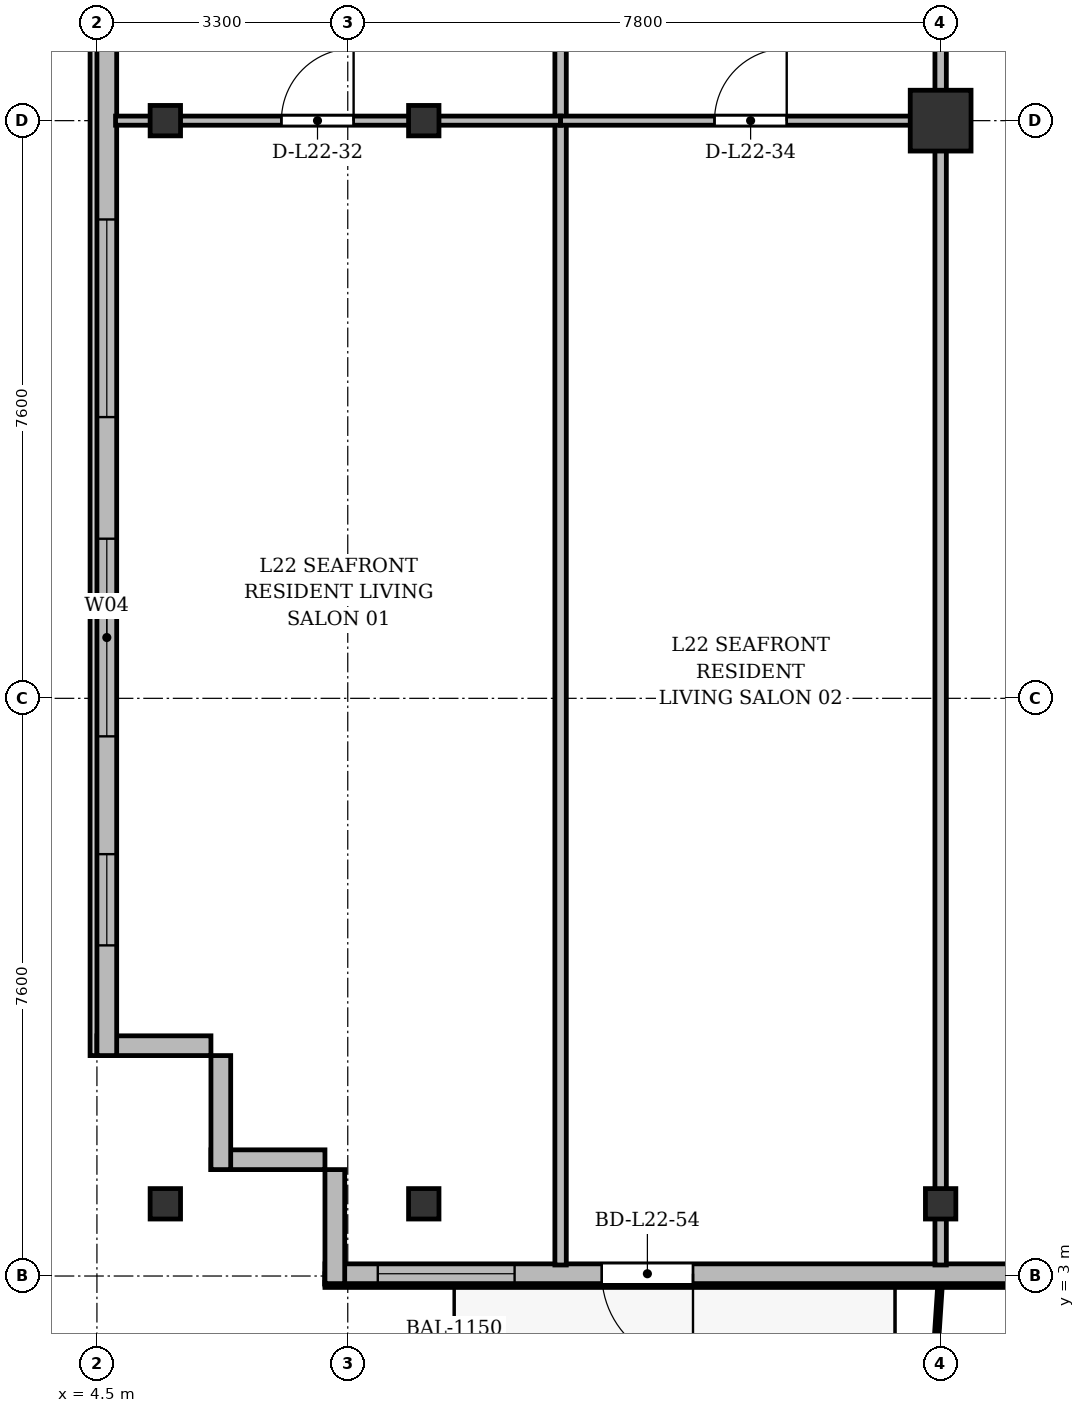
"""IFC4 building model, lengths in metres.
Left out: names, types, materials, properties, quantities, classifications, styles, units other than length and angle.
Written with IfcOpenShell. Run it as: python <this file> out.ifc"""

import sys

from ifc_helpers import new_model, si_unit, direction, frame, frame_2d, origin, origin_2d, place, context, subcontext, project, spatial, rectangle, i_section, extrude, source, transform, mapped, element, fill, save


model = new_model("IFC4")
c1 = context("Model", 3, precision=1e-05, world=origin(), true_north=direction((0.0, 1.0)))
c2 = subcontext(c1, "Body", "Model", "MODEL_VIEW")
j1 = project(units=[si_unit("LENGTHUNIT", "METRE"), si_unit("PLANEANGLEUNIT", "RADIAN")], contexts=[c1])
p1 = place(None, origin())
s1 = spatial("IfcSite", under=j1, at=p1, CompositionType="ELEMENT")
p2 = place(p1, origin())
s2 = spatial("IfcBuilding", under=s1, at=p2, CompositionType="ELEMENT")
p3 = place(p2, frame((0.0, 0.0, 88.9)))
s3 = spatial("IfcBuildingStorey", under=s2, at=p3, CompositionType="ELEMENT", Elevation=88.9)
m1 = source(origin(), c2, "Body", "SweptSolid", [
    extrude(i_section(OverallWidth=0.4, OverallDepth=0.4, WebThickness=0.022, FlangeThickness=0.035, at=origin_2d()), origin(), (0.0, 0.0, 1.0), 3.6),
])
for number, where, z_axis, x_axis in (
    (1, (5.4, 3.95, 0.0), (0.0, 0.0, 1.0), (1.0, 0.0, 0.0)),
    (2, (5.4, 18.2, 0.0), (0.0, 0.0, 1.0), (1.0, 0.0, 0.0)),
    (3, (8.8, 3.95, 0.0), (0.0, 0.0, 1.0), (1.0, 0.0, 0.0)),
    (4, (8.8, 18.2, 0.0), (0.0, 0.0, 1.0), (1.0, 0.0, 0.0)),
    (5, (15.6, 3.95, 0.0), (0.0, 0.0, 1.0), (1.0, 0.0, 0.0)),
):
    element("IfcColumn", number, at=place(p3, frame(where, z_axis=z_axis, x_axis=x_axis)), inside=s3, PredefinedType="COLUMN", context=c2, shape_type="MappedRepresentation", body=[
        mapped(m1, transform((0.0, 0.0, 0.0), x_axis=(1.0, 0.0, 0.0), y_axis=(0.0, 1.0, 0.0), z_axis=(0.0, 0.0, 1.0), scale=1.0)),
    ])
m2 = source(origin(), c2, "Body", "SweptSolid", [
    extrude(rectangle(XDim=0.8, YDim=0.8, at=origin_2d()), origin(), (0.0, 0.0, 1.0), 3.6),
])
p4 = place(p3, frame((15.6, 18.2, 0.0), z_axis=(0.0, 0.0, 1.0), x_axis=(1.0, 0.0, 0.0)))
e6 = element("IfcColumn", 6, at=p4, inside=s3, PredefinedType="COLUMN", context=c2, shape_type="MappedRepresentation", body=[
    mapped(m2, transform((0.0, 0.0, 0.0), x_axis=(1.0, 0.0, 0.0), y_axis=(0.0, 1.0, 0.0), z_axis=(0.0, 0.0, 1.0), scale=1.0)),
])
for number, where, z_axis, x_axis in (
    (7, (7.5, 4.53, 0.0), (0.0, 0.0, 1.0), (-1.0, 0.0, 0.0)),
    (8, (6.13, 4.4, 0.0), (0.0, 0.0, 1.0), (0.0, 1.0, 0.0)),
):
    element("IfcWall", number, at=place(p3, frame(where, z_axis=z_axis, x_axis=x_axis)), inside=s3, PredefinedType="SOLIDWALL", context=c2, shape_type="SweptSolid", body=[
        extrude(rectangle(XDim=1.5, YDim=0.26, at=frame_2d((0.75, 0.0))), origin(), (0.0, 0.0, 1.0), 3.34),
    ])
p5 = place(p3, frame((6.0, 6.03, 0.0), z_axis=(0.0, 0.0, 1.0), x_axis=(-1.0, 0.0, 0.0)))
e9 = element("IfcWall", 9, at=p5, inside=s3, PredefinedType="SOLIDWALL", context=c2, shape_type="SweptSolid", body=[
    extrude(rectangle(XDim=1.5, YDim=0.26, at=frame_2d((0.75, 0.0))), origin(), (0.0, 0.0, 1.0), 2.84),
])
p6 = place(p3, frame((4.63, 5.9, 0.0), z_axis=(0.0, 0.0, 1.0), x_axis=(0.0, 1.0, 0.0)))
e10 = element("IfcWall", 10, at=p6, inside=s3, PredefinedType="SOLIDWALL", context=c2, shape_type="SweptSolid", body=[
    extrude(rectangle(XDim=39.6, YDim=0.26, at=frame_2d((19.8, 0.0))), origin(), (0.0, 0.0, 1.0), 3.34),
])
p7 = place(p6, frame((1.45, 0.0, 0.92)))
e11 = element("IfcOpeningElement", 11, at=p7, cuts=e10, PredefinedType="OPENING", context=c2, shape_type="SweptSolid", body=[
    extrude(rectangle(XDim=1.2, YDim=1.65, at=frame_2d((0.6, 0.825))), frame((0.0, 0.14, 0.0), z_axis=(0.0, -1.0, 0.0), x_axis=(1.0, 0.0, 0.0)), (0.0, 0.0, 1.0), 0.28),
])
p8 = place(p6, frame((4.2, 0.0, 0.92)))
e12 = element("IfcOpeningElement", 12, at=p8, cuts=e10, PredefinedType="OPENING", context=c2, shape_type="SweptSolid", body=[
    extrude(rectangle(XDim=2.6, YDim=1.9, at=frame_2d((1.3, 0.95))), frame((0.0, 0.14, 0.0), z_axis=(0.0, -1.0, 0.0), x_axis=(1.0, 0.0, 0.0)), (0.0, 0.0, 1.0), 0.28),
])
p9 = place(p6, frame((8.4, 0.0, 0.92)))
e13 = element("IfcOpeningElement", 13, at=p9, cuts=e10, PredefinedType="OPENING", context=c2, shape_type="SweptSolid", body=[
    extrude(rectangle(XDim=2.6, YDim=1.9, at=frame_2d((1.3, 0.95))), frame((0.0, 0.14, 0.0), z_axis=(0.0, -1.0, 0.0), x_axis=(1.0, 0.0, 0.0)), (0.0, 0.0, 1.0), 0.28),
])
p10 = place(p6, frame((15.6, 0.0, 0.92)))
e14 = element("IfcOpeningElement", 14, at=p10, cuts=e10, PredefinedType="OPENING", context=c2, shape_type="SweptSolid", body=[
    extrude(rectangle(XDim=2.6, YDim=1.9, at=frame_2d((1.3, 0.95))), frame((0.0, 0.14, 0.0), z_axis=(0.0, -1.0, 0.0), x_axis=(1.0, 0.0, 0.0)), (0.0, 0.0, 1.0), 0.28),
])
p11 = place(p6, frame((29.6, 0.0, 0.92)))
e15 = element("IfcOpeningElement", 15, at=p11, cuts=e10, PredefinedType="OPENING", context=c2, shape_type="SweptSolid", body=[
    extrude(rectangle(XDim=2.6, YDim=1.9, at=frame_2d((1.3, 0.95))), frame((0.0, 0.14, 0.0), z_axis=(0.0, -1.0, 0.0), x_axis=(1.0, 0.0, 0.0)), (0.0, 0.0, 1.0), 0.28),
])
p12 = place(p6, frame((37.25, 0.0, 0.92)))
e16 = element("IfcOpeningElement", 16, at=p12, cuts=e10, PredefinedType="OPENING", context=c2, shape_type="SweptSolid", body=[
    extrude(rectangle(XDim=1.2, YDim=1.65, at=frame_2d((0.6, 0.825))), frame((0.0, 0.14, 0.0), z_axis=(0.0, -1.0, 0.0), x_axis=(1.0, 0.0, 0.0)), (0.0, 0.0, 1.0), 0.28),
])
p13 = place(p3, frame((66.9, 3.03, 0.0), z_axis=(0.0, 0.0, 1.0), x_axis=(-1.0, 0.0, 0.0)))
e17 = element("IfcWall", 17, at=p13, inside=s3, PredefinedType="SOLIDWALL", context=c2, shape_type="SweptSolid", body=[
    extrude(rectangle(XDim=59.4, YDim=0.26, at=frame_2d((29.7, 0.0))), origin(), (0.0, 0.0, 1.0), 3.34),
])
p14 = place(p13, frame((0.945, 0.0, 0.9)))
e18 = element("IfcOpeningElement", 18, at=p14, cuts=e17, PredefinedType="OPENING", context=c2, shape_type="SweptSolid", body=[
    extrude(rectangle(XDim=1.5, YDim=1.75, at=frame_2d((0.75, 0.875))), frame((0.0, 0.14, 0.0), z_axis=(0.0, -1.0, 0.0), x_axis=(1.0, 0.0, 0.0)), (0.0, 0.0, 1.0), 0.28),
])
p15 = place(p13, frame((4.7, 0.0, 0.9)))
e19 = element("IfcOpeningElement", 19, at=p15, cuts=e17, PredefinedType="OPENING", context=c2, shape_type="SweptSolid", body=[
    extrude(rectangle(XDim=2.0, YDim=1.95, at=frame_2d((1.0, 0.975))), frame((0.0, 0.14, 0.0), z_axis=(0.0, -1.0, 0.0), x_axis=(1.0, 0.0, 0.0)), (0.0, 0.0, 1.0), 0.28),
])
p16 = place(p13, frame((9.18, 0.0, 0.0)))
e20 = element("IfcOpeningElement", 20, at=p16, cuts=e17, PredefinedType="OPENING", context=c2, shape_type="SweptSolid", body=[
    extrude(rectangle(XDim=1.2, YDim=2.2, at=frame_2d((0.6, 1.1))), frame((0.0, 0.14, 0.0), z_axis=(0.0, -1.0, 0.0), x_axis=(1.0, 0.0, 0.0)), (0.0, 0.0, 1.0), 0.28),
])
p17 = place(p13, frame((13.05, 0.0, 0.9)))
e21 = element("IfcOpeningElement", 21, at=p17, cuts=e17, PredefinedType="OPENING", context=c2, shape_type="SweptSolid", body=[
    extrude(rectangle(XDim=1.8, YDim=1.8, at=frame_2d((0.9, 0.9))), frame((0.0, 0.14, 0.0), z_axis=(0.0, -1.0, 0.0), x_axis=(1.0, 0.0, 0.0)), (0.0, 0.0, 1.0), 0.28),
])
p18 = place(p13, frame((16.35, 0.0, 0.9)))
e22 = element("IfcOpeningElement", 22, at=p18, cuts=e17, PredefinedType="OPENING", context=c2, shape_type="SweptSolid", body=[
    extrude(rectangle(XDim=1.5, YDim=1.75, at=frame_2d((0.75, 0.875))), frame((0.0, 0.14, 0.0), z_axis=(0.0, -1.0, 0.0), x_axis=(1.0, 0.0, 0.0)), (0.0, 0.0, 1.0), 0.28),
])
p19 = place(p13, frame((18.75, 0.0, 0.9)))
e23 = element("IfcOpeningElement", 23, at=p19, cuts=e17, PredefinedType="OPENING", context=c2, shape_type="SweptSolid", body=[
    extrude(rectangle(XDim=1.5, YDim=1.75, at=frame_2d((0.75, 0.875))), frame((0.0, 0.14, 0.0), z_axis=(0.0, -1.0, 0.0), x_axis=(1.0, 0.0, 0.0)), (0.0, 0.0, 1.0), 0.28),
])
p20 = place(p13, frame((20.9, 0.0, 0.9)))
e24 = element("IfcOpeningElement", 24, at=p20, cuts=e17, PredefinedType="OPENING", context=c2, shape_type="SweptSolid", body=[
    extrude(rectangle(XDim=2.0, YDim=1.95, at=frame_2d((1.0, 0.975))), frame((0.0, 0.14, 0.0), z_axis=(0.0, -1.0, 0.0), x_axis=(1.0, 0.0, 0.0)), (0.0, 0.0, 1.0), 0.28),
])
p21 = place(p13, frame((24.025, 0.0, 0.9)))
e25 = element("IfcOpeningElement", 25, at=p21, cuts=e17, PredefinedType="OPENING", context=c2, shape_type="SweptSolid", body=[
    extrude(rectangle(XDim=1.65, YDim=1.85, at=frame_2d((0.825, 0.925))), frame((0.0, 0.14, 0.0), z_axis=(0.0, -1.0, 0.0), x_axis=(1.0, 0.0, 0.0)), (0.0, 0.0, 1.0), 0.28),
])
p22 = place(p13, frame((27.45, 0.0, 0.9)))
e26 = element("IfcOpeningElement", 26, at=p22, cuts=e17, PredefinedType="OPENING", context=c2, shape_type="SweptSolid", body=[
    extrude(rectangle(XDim=1.8, YDim=1.8, at=frame_2d((0.9, 0.9))), frame((0.0, 0.14, 0.0), z_axis=(0.0, -1.0, 0.0), x_axis=(1.0, 0.0, 0.0)), (0.0, 0.0, 1.0), 0.28),
])
p23 = place(p13, frame((32.1, 0.0, 0.9)))
e27 = element("IfcOpeningElement", 27, at=p23, cuts=e17, PredefinedType="OPENING", context=c2, shape_type="SweptSolid", body=[
    extrude(rectangle(XDim=2.2, YDim=1.8, at=frame_2d((1.1, 0.9))), frame((0.0, 0.14, 0.0), z_axis=(0.0, -1.0, 0.0), x_axis=(1.0, 0.0, 0.0)), (0.0, 0.0, 1.0), 0.28),
])
p24 = place(p13, frame((40.301, 0.0, 0.0)))
e28 = element("IfcOpeningElement", 28, at=p24, cuts=e17, PredefinedType="OPENING", context=c2, shape_type="SweptSolid", body=[
    extrude(rectangle(XDim=1.2, YDim=2.2, at=frame_2d((0.6, 1.1))), frame((0.0, 0.14, 0.0), z_axis=(0.0, -1.0, 0.0), x_axis=(1.0, 0.0, 0.0)), (0.0, 0.0, 1.0), 0.28),
])
p25 = place(p13, frame((46.4, 0.0, 0.9)))
e29 = element("IfcOpeningElement", 29, at=p25, cuts=e17, PredefinedType="OPENING", context=c2, shape_type="SweptSolid", body=[
    extrude(rectangle(XDim=2.0, YDim=1.95, at=frame_2d((1.0, 0.975))), frame((0.0, 0.14, 0.0), z_axis=(0.0, -1.0, 0.0), x_axis=(1.0, 0.0, 0.0)), (0.0, 0.0, 1.0), 0.28),
])
p26 = place(p13, frame((54.558, 0.0, 0.0)))
e30 = element("IfcOpeningElement", 30, at=p26, cuts=e17, PredefinedType="OPENING", context=c2, shape_type="SweptSolid", body=[
    extrude(rectangle(XDim=1.2, YDim=2.2, at=frame_2d((0.6, 1.1))), frame((0.0, 0.14, 0.0), z_axis=(0.0, -1.0, 0.0), x_axis=(1.0, 0.0, 0.0)), (0.0, 0.0, 1.0), 0.28),
])
p27 = place(p13, frame((56.905, 0.0, 0.9)))
e31 = element("IfcOpeningElement", 31, at=p27, cuts=e17, PredefinedType="OPENING", context=c2, shape_type="SweptSolid", body=[
    extrude(rectangle(XDim=1.8, YDim=1.8, at=frame_2d((0.9, 0.9))), frame((0.0, 0.14, 0.0), z_axis=(0.0, -1.0, 0.0), x_axis=(1.0, 0.0, 0.0)), (0.0, 0.0, 1.0), 0.28),
])
p28 = place(p3, frame((7.63, 2.9, 0.0), z_axis=(0.0, 0.0, 1.0), x_axis=(0.0, 1.0, 0.0)))
e32 = element("IfcWall", 32, at=p28, inside=s3, PredefinedType="SOLIDWALL", context=c2, shape_type="SweptSolid", body=[
    extrude(rectangle(XDim=1.5, YDim=0.26, at=frame_2d((0.75, 0.0))), origin(), (0.0, 0.0, 1.0), 2.752),
])
p29 = place(p3, frame((10.6, 3.145, 0.0), z_axis=(0.0, 0.0, 1.0), x_axis=(0.0, 1.0, 0.0)))
e33 = element("IfcWall", 33, at=p29, inside=s3, PredefinedType="PARTITIONING", context=c2, shape_type="SweptSolid", body=[
    extrude(rectangle(XDim=24.455, YDim=0.15, at=frame_2d((12.228, 0.0))), origin(), (0.0, 0.0, 1.0), 2.752),
])
p30 = place(p3, frame((15.6, 3.145, 0.0), z_axis=(0.0, 0.0, 1.0), x_axis=(0.0, 1.0, 0.0)))
e34 = element("IfcWall", 34, at=p30, inside=s3, PredefinedType="PARTITIONING", context=c2, shape_type="SweptSolid", body=[
    extrude(rectangle(XDim=24.455, YDim=0.15, at=frame_2d((12.228, 0.0))), origin(), (0.0, 0.0, 1.0), 2.84),
])
p31 = place(p3, frame((4.745, 18.2, 0.0), z_axis=(0.0, 0.0, 1.0), x_axis=(1.0, 0.0, 0.0)))
e35 = element("IfcWall", 35, at=p31, inside=s3, PredefinedType="PARTITIONING", context=c2, shape_type="SweptSolid", body=[
    extrude(rectangle(XDim=5.855, YDim=0.12, at=frame_2d((2.927, 0.0))), origin(), (0.0, 0.0, 1.0), 2.752),
])
p32 = place(p31, frame((2.182, 0.0, 0.0)))
e36 = element("IfcOpeningElement", 36, at=p32, cuts=e35, PredefinedType="OPENING", context=c2, shape_type="SweptSolid", body=[
    extrude(rectangle(XDim=0.95, YDim=2.15, at=frame_2d((0.475, 1.075))), frame((0.0, 0.07, 0.0), z_axis=(0.0, -1.0, 0.0), x_axis=(1.0, 0.0, 0.0)), (0.0, 0.0, 1.0), 0.14),
])
p33 = place(p3, frame((10.6, 18.2, 0.0), z_axis=(0.0, 0.0, 1.0), x_axis=(1.0, 0.0, 0.0)))
e37 = element("IfcWall", 37, at=p33, inside=s3, PredefinedType="PARTITIONING", context=c2, shape_type="SweptSolid", body=[
    extrude(rectangle(XDim=5.0, YDim=0.12, at=frame_2d((2.5, 0.0))), origin(), (0.0, 0.0, 1.0), 2.752),
])
p34 = place(p33, frame((2.025, 0.0, 0.0)))
e38 = element("IfcOpeningElement", 38, at=p34, cuts=e37, PredefinedType="OPENING", context=c2, shape_type="SweptSolid", body=[
    extrude(rectangle(XDim=0.95, YDim=2.15, at=frame_2d((0.475, 1.075))), frame((0.0, 0.07, 0.0), z_axis=(0.0, -1.0, 0.0), x_axis=(1.0, 0.0, 0.0)), (0.0, 0.0, 1.0), 0.14),
])
m3 = source(origin(), c2, "Body", "SweptSolid", [
    extrude(rectangle(XDim=1.2, YDim=1.65, at=frame_2d((0.6, 0.825))), frame((0.0, 0.03, 0.0), z_axis=(0.0, -1.0, 0.0), x_axis=(1.0, 0.0, 0.0)), (0.0, 0.0, 1.0), 0.06),
])
p35 = place(p7, origin())
e39 = element("IfcWindow", 39, at=p35, inside=s3, PartitioningType="SINGLE_PANEL", PredefinedType="WINDOW", context=c2, shape_type="MappedRepresentation", body=[
    mapped(m3, transform((0.0, 0.0, 0.0), x_axis=(1.0, 0.0, 0.0), y_axis=(0.0, 1.0, 0.0), z_axis=(0.0, 0.0, 1.0), scale=1.0)),
])
fill(e11, e39)
m4 = source(origin(), c2, "Body", "SweptSolid", [
    extrude(rectangle(XDim=2.6, YDim=1.9, at=frame_2d((1.3, 0.95))), frame((0.0, 0.03, 0.0), z_axis=(0.0, -1.0, 0.0), x_axis=(1.0, 0.0, 0.0)), (0.0, 0.0, 1.0), 0.06),
])
p36 = place(p8, origin())
e40 = element("IfcWindow", 40, at=p36, inside=s3, PartitioningType="SINGLE_PANEL", PredefinedType="WINDOW", context=c2, shape_type="MappedRepresentation", body=[
    mapped(m4, transform((0.0, 0.0, 0.0), x_axis=(1.0, 0.0, 0.0), y_axis=(0.0, 1.0, 0.0), z_axis=(0.0, 0.0, 1.0), scale=1.0)),
])
fill(e12, e40)
p37 = place(p9, origin())
e41 = element("IfcWindow", 41, at=p37, inside=s3, PartitioningType="SINGLE_PANEL", PredefinedType="WINDOW", context=c2, shape_type="MappedRepresentation", body=[
    mapped(m4, transform((0.0, 0.0, 0.0), x_axis=(1.0, 0.0, 0.0), y_axis=(0.0, 1.0, 0.0), z_axis=(0.0, 0.0, 1.0), scale=1.0)),
])
fill(e13, e41)
m5 = source(origin(), c2, "Body", "SweptSolid", [
    extrude(rectangle(XDim=1.2, YDim=2.2, at=frame_2d((0.6, 1.1))), frame((0.0, 0.025, 0.0), z_axis=(0.0, -1.0, 0.0), x_axis=(1.0, 0.0, 0.0)), (0.0, 0.0, 1.0), 0.05),
])
p38 = place(p26, origin())
e42 = element("IfcDoor", 42, at=p38, inside=s3, OperationType="SINGLE_SWING_LEFT", PredefinedType="DOOR", context=c2, shape_type="MappedRepresentation", body=[
    mapped(m5, transform((0.0, 0.0, 0.0), x_axis=(1.0, 0.0, 0.0), y_axis=(0.0, 1.0, 0.0), z_axis=(0.0, 0.0, 1.0), scale=1.0)),
])
fill(e30, e42)
m6 = source(origin(), c2, "Body", "SweptSolid", [
    extrude(rectangle(XDim=1.8, YDim=1.8, at=frame_2d((0.9, 0.9))), frame((0.0, 0.03, 0.0), z_axis=(0.0, -1.0, 0.0), x_axis=(1.0, 0.0, 0.0)), (0.0, 0.0, 1.0), 0.06),
])
p39 = place(p27, origin())
e43 = element("IfcWindow", 43, at=p39, inside=s3, PartitioningType="SINGLE_PANEL", PredefinedType="WINDOW", context=c2, shape_type="MappedRepresentation", body=[
    mapped(m6, transform((0.0, 0.0, 0.0), x_axis=(1.0, 0.0, 0.0), y_axis=(0.0, 1.0, 0.0), z_axis=(0.0, 0.0, 1.0), scale=1.0)),
])
fill(e31, e43)
m7 = source(origin(), c2, "Body", "SweptSolid", [
    extrude(rectangle(XDim=0.95, YDim=2.15, at=frame_2d((0.475, 1.075))), frame((0.0, 0.025, 0.0), z_axis=(0.0, -1.0, 0.0), x_axis=(1.0, 0.0, 0.0)), (0.0, 0.0, 1.0), 0.05),
])
p40 = place(p32, origin())
e44 = element("IfcDoor", 44, at=p40, inside=s3, OperationType="SINGLE_SWING_RIGHT", PredefinedType="DOOR", context=c2, shape_type="MappedRepresentation", body=[
    mapped(m7, transform((0.0, 0.0, 0.0), x_axis=(1.0, 0.0, 0.0), y_axis=(0.0, 1.0, 0.0), z_axis=(0.0, 0.0, 1.0), scale=1.0)),
])
fill(e36, e44)
p41 = place(p34, origin())
e45 = element("IfcDoor", 45, at=p41, inside=s3, OperationType="SINGLE_SWING_RIGHT", PredefinedType="DOOR", context=c2, shape_type="MappedRepresentation", body=[
    mapped(m7, transform((0.0, 0.0, 0.0), x_axis=(1.0, 0.0, 0.0), y_axis=(0.0, 1.0, 0.0), z_axis=(0.0, 0.0, 1.0), scale=1.0)),
])
fill(e38, e45)
save(model, sys.argv[1])
